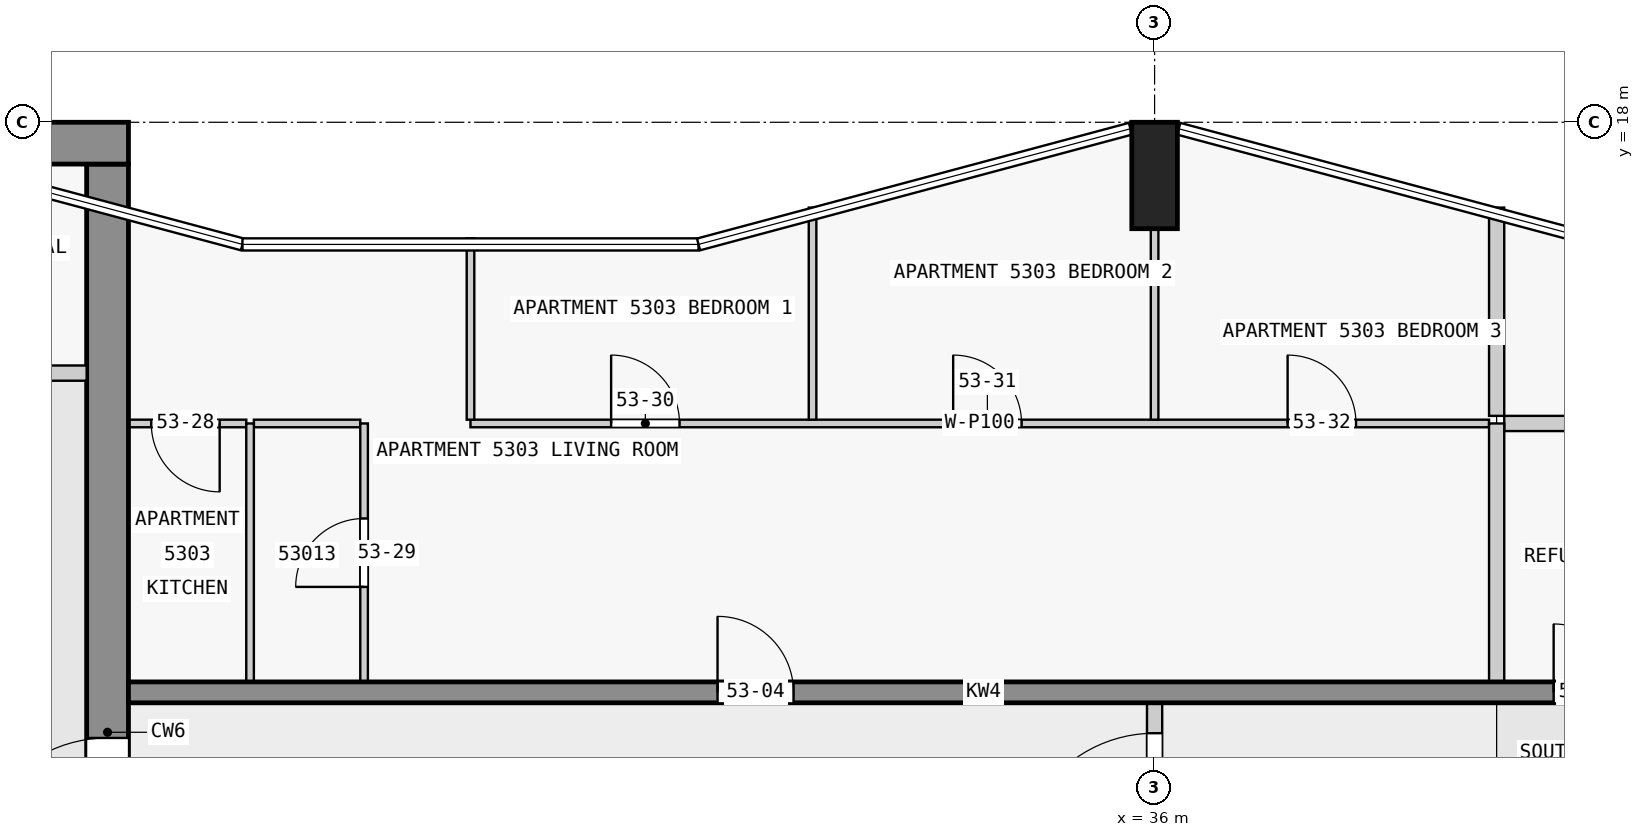
"""IFC4 building model, lengths in metres.
Left out: names, types, materials, properties, quantities, classifications, styles, units other than length and angle.
Written with IfcOpenShell. Run it as: python <this file> out.ifc"""

import sys

from ifc_helpers import new_model, si_unit, direction, frame, frame_2d, origin, origin_2d, place, context, subcontext, project, spatial, rectangle, extrude, element, fill, save


model = new_model("IFC4")
c1 = context("Model", 3, precision=1e-05, world=origin(), true_north=direction((0.0, 1.0)))
c2 = subcontext(c1, "Body", "Model", "MODEL_VIEW")
j1 = project(units=[si_unit("LENGTHUNIT", "METRE"), si_unit("PLANEANGLEUNIT", "RADIAN")], contexts=[c1])
p1 = place(None, origin())
s1 = spatial("IfcSite", under=j1, at=p1, CompositionType="ELEMENT")
p2 = place(p1, origin())
s2 = spatial("IfcBuilding", under=s1, at=p2, CompositionType="ELEMENT")
p3 = place(p2, frame((0.0, 0.0, 204.9)))
s3 = spatial("IfcBuildingStorey", under=s2, at=p3, CompositionType="ELEMENT", Elevation=204.9)
p4 = place(p3, frame((36.0, 17.3, 0.0), z_axis=(0.0, 0.0, 1.0), x_axis=(1.0, 0.0, 0.0)))
e1 = element("IfcColumn", 1, at=p4, inside=s3, PredefinedType="COLUMN", context=c2, shape_type="SweptSolid", body=[
    extrude(rectangle(XDim=0.6, YDim=1.4, at=origin_2d()), origin(), (0.0, 0.0, 1.0), 3.5),
])
p5 = place(p3, frame((1.38, 17.725, 0.0), z_axis=(0.0, 0.0, 1.0), x_axis=(1.0, 0.0, 0.0)))
e2 = element("IfcWall", 2, at=p5, inside=s3, PredefinedType="SHEAR", context=c2, shape_type="SweptSolid", body=[
    extrude(rectangle(XDim=21.12, YDim=0.55, at=frame_2d((10.56, 0.0))), origin(), (0.0, 0.0, 1.0), 3.25),
])
p6 = place(p5, frame((6.35, 0.0, 0.0)))
e3 = element("IfcOpeningElement", 3, at=p6, cuts=e2, PredefinedType="OPENING", context=c2, shape_type="SweptSolid", body=[
    extrude(rectangle(XDim=1.8, YDim=2.1, at=frame_2d((0.9, 1.05))), frame((0.0, 0.285, 0.0), z_axis=(0.0, -1.0, 0.0), x_axis=(1.0, 0.0, 0.0)), (0.0, 0.0, 1.0), 0.57),
])
p7 = place(p3, frame((22.225, 2.5, 0.0), z_axis=(0.0, 0.0, 1.0), x_axis=(0.0, 1.0, 0.0)))
e4 = element("IfcWall", 4, at=p7, inside=s3, PredefinedType="SHEAR", context=c2, shape_type="SweptSolid", body=[
    extrude(rectangle(XDim=14.95, YDim=0.55, at=frame_2d((7.475, 0.0))), origin(), (0.0, 0.0, 1.0), 3.25),
])
p8 = place(p7, frame((5.6, 0.0, 0.0)))
e5 = element("IfcOpeningElement", 5, at=p8, cuts=e4, PredefinedType="OPENING", context=c2, shape_type="SweptSolid", body=[
    extrude(rectangle(XDim=1.8, YDim=2.1, at=frame_2d((0.9, 1.05))), frame((0.0, 0.285, 0.0), z_axis=(0.0, -1.0, 0.0), x_axis=(1.0, 0.0, 0.0)), (0.0, 0.0, 1.0), 0.57),
])
p9 = place(p3, frame((22.5, 10.5, 0.0), z_axis=(0.0, 0.0, 1.0), x_axis=(1.0, 0.0, 0.0)))
e6 = element("IfcWall", 6, at=p9, inside=s3, PredefinedType="SHEAR", context=c2, shape_type="SweptSolid", body=[
    extrude(rectangle(XDim=22.5, YDim=0.275, at=frame_2d((11.25, 0.0))), origin(), (0.0, 0.0, 1.0), 3.25),
])
p10 = place(p9, frame((7.75, 0.0, 0.0)))
e7 = element("IfcOpeningElement", 7, at=p10, cuts=e6, PredefinedType="OPENING", context=c2, shape_type="SweptSolid", body=[
    extrude(rectangle(XDim=1.0, YDim=2.1, at=frame_2d((0.5, 1.05))), frame((0.0, 0.147, 0.0), z_axis=(0.0, -1.0, 0.0), x_axis=(1.0, 0.0, 0.0)), (0.0, 0.0, 1.0), 0.295),
])
p11 = place(p9, frame((18.75, 0.0, 0.0)))
e8 = element("IfcOpeningElement", 8, at=p11, cuts=e6, PredefinedType="OPENING", context=c2, shape_type="SweptSolid", body=[
    extrude(rectangle(XDim=0.9, YDim=2.1, at=frame_2d((0.45, 1.05))), frame((0.0, 0.147, 0.0), z_axis=(0.0, -1.0, 0.0), x_axis=(1.0, 0.0, 0.0)), (0.0, 0.0, 1.0), 0.295),
])
p12 = place(p9, frame((20.95, 0.0, 0.0)))
e9 = element("IfcOpeningElement", 9, at=p12, cuts=e6, PredefinedType="OPENING", context=c2, shape_type="SweptSolid", body=[
    extrude(rectangle(XDim=1.0, YDim=2.1, at=frame_2d((0.5, 1.05))), frame((0.0, 0.147, 0.0), z_axis=(0.0, -1.0, 0.0), x_axis=(1.0, 0.0, 0.0)), (0.0, 0.0, 1.0), 0.295),
])
p13 = place(p3, frame((18.6, 14.7, 0.0), z_axis=(0.0, 0.0, 1.0), x_axis=(1.0, 0.0, 0.0)))
e10 = element("IfcWall", 10, at=p13, inside=s3, PredefinedType="PARTITIONING", context=c2, shape_type="SweptSolid", body=[
    extrude(rectangle(XDim=3.35, YDim=0.2, at=frame_2d((1.675, 0.0))), origin(), (0.0, 0.0, 1.0), 3.25),
])
p14 = place(p13, frame((0.15, 0.0, 0.0)))
e11 = element("IfcOpeningElement", 11, at=p14, cuts=e10, PredefinedType="OPENING", context=c2, shape_type="SweptSolid", body=[
    extrude(rectangle(XDim=0.9, YDim=2.1, at=frame_2d((0.45, 1.05))), frame((0.0, 0.11, 0.0), z_axis=(0.0, -1.0, 0.0), x_axis=(1.0, 0.0, 0.0)), (0.0, 0.0, 1.0), 0.22),
])
p15 = place(p13, frame((1.825, 0.0, 0.0)))
e12 = element("IfcOpeningElement", 12, at=p15, cuts=e10, PredefinedType="OPENING", context=c2, shape_type="SweptSolid", body=[
    extrude(rectangle(XDim=0.9, YDim=2.1, at=frame_2d((0.45, 1.05))), frame((0.0, 0.11, 0.0), z_axis=(0.0, -1.0, 0.0), x_axis=(1.0, 0.0, 0.0)), (0.0, 0.0, 1.0), 0.22),
])
p16 = place(p3, frame((24.05, 14.038, 0.0), z_axis=(0.0, 0.0, 1.0), x_axis=(-1.0, 0.0, 0.0)))
e13 = element("IfcWall", 13, at=p16, inside=s3, PredefinedType="PARTITIONING", context=c2, shape_type="SweptSolid", body=[
    extrude(rectangle(XDim=1.55, YDim=0.1, at=frame_2d((0.775, 0.0))), origin(), (0.0, 0.0, 1.0), 3.25),
])
p17 = place(p16, frame((0.35, 0.0, 0.0)))
e14 = element("IfcOpeningElement", 14, at=p17, cuts=e13, PredefinedType="OPENING", context=c2, shape_type="SweptSolid", body=[
    extrude(rectangle(XDim=0.9, YDim=2.1, at=frame_2d((0.45, 1.05))), frame((0.0, 0.06, 0.0), z_axis=(0.0, -1.0, 0.0), x_axis=(1.0, 0.0, 0.0)), (0.0, 0.0, 1.0), 0.12),
])
p18 = place(p3, frame((25.55, 14.038, 0.0), z_axis=(0.0, 0.0, 1.0), x_axis=(-1.0, 0.0, 0.0)))
e15 = element("IfcWall", 15, at=p18, inside=s3, PredefinedType="PARTITIONING", context=c2, shape_type="SweptSolid", body=[
    extrude(rectangle(XDim=1.4, YDim=0.1, at=frame_2d((0.7, 0.0))), origin(), (0.0, 0.0, 1.0), 3.25),
])
p19 = place(p3, frame((27.0, 14.038, 0.0), z_axis=(0.0, 0.0, 1.0), x_axis=(1.0, 0.0, 0.0)))
e16 = element("IfcWall", 16, at=p19, inside=s3, PredefinedType="PARTITIONING", context=c2, shape_type="SweptSolid", body=[
    extrude(rectangle(XDim=13.4, YDim=0.1, at=frame_2d((6.7, 0.0))), origin(), (0.0, 0.0, 1.0), 3.25),
])
p20 = place(p19, frame((1.85, 0.0, 0.0)))
e17 = element("IfcOpeningElement", 17, at=p20, cuts=e16, PredefinedType="OPENING", context=c2, shape_type="SweptSolid", body=[
    extrude(rectangle(XDim=0.9, YDim=2.1, at=frame_2d((0.45, 1.05))), frame((0.0, 0.06, 0.0), z_axis=(0.0, -1.0, 0.0), x_axis=(1.0, 0.0, 0.0)), (0.0, 0.0, 1.0), 0.12),
])
p21 = place(p19, frame((6.35, 0.0, 0.0)))
e18 = element("IfcOpeningElement", 18, at=p21, cuts=e16, PredefinedType="OPENING", context=c2, shape_type="SweptSolid", body=[
    extrude(rectangle(XDim=0.9, YDim=2.1, at=frame_2d((0.45, 1.05))), frame((0.0, 0.06, 0.0), z_axis=(0.0, -1.0, 0.0), x_axis=(1.0, 0.0, 0.0)), (0.0, 0.0, 1.0), 0.12),
])
p22 = place(p19, frame((10.75, 0.0, 0.0)))
e19 = element("IfcOpeningElement", 19, at=p22, cuts=e16, PredefinedType="OPENING", context=c2, shape_type="SweptSolid", body=[
    extrude(rectangle(XDim=0.9, YDim=2.1, at=frame_2d((0.45, 1.05))), frame((0.0, 0.06, 0.0), z_axis=(0.0, -1.0, 0.0), x_axis=(1.0, 0.0, 0.0)), (0.0, 0.0, 1.0), 0.12),
])
p23 = place(p3, frame((42.8, 14.038, 0.0), z_axis=(0.0, 0.0, 1.0), x_axis=(-1.0, 0.0, 0.0)))
e20 = element("IfcWall", 20, at=p23, inside=s3, PredefinedType="PARTITIONING", context=c2, shape_type="SweptSolid", body=[
    extrude(rectangle(XDim=2.2, YDim=0.2, at=frame_2d((1.1, 0.0))), origin(), (0.0, 0.0, 1.0), 3.25),
])
p24 = place(p3, frame((24.1, 10.637, 0.0), z_axis=(0.0, 0.0, 1.0), x_axis=(0.0, 1.0, 0.0)))
e21 = element("IfcWall", 21, at=p24, inside=s3, PredefinedType="PARTITIONING", context=c2, shape_type="SweptSolid", body=[
    extrude(rectangle(XDim=3.4, YDim=0.1, at=frame_2d((1.7, 0.0))), origin(), (0.0, 0.0, 1.0), 3.25),
])
p25 = place(p3, frame((25.6, 10.637, 0.0), z_axis=(0.0, 0.0, 1.0), x_axis=(0.0, 1.0, 0.0)))
e22 = element("IfcWall", 22, at=p25, inside=s3, PredefinedType="PARTITIONING", context=c2, shape_type="SweptSolid", body=[
    extrude(rectangle(XDim=3.4, YDim=0.1, at=frame_2d((1.7, 0.0))), origin(), (0.0, 0.0, 1.0), 3.25),
])
p26 = place(p25, frame((1.25, 0.0, 0.0)))
e23 = element("IfcOpeningElement", 23, at=p26, cuts=e22, PredefinedType="OPENING", context=c2, shape_type="SweptSolid", body=[
    extrude(rectangle(XDim=0.9, YDim=2.1, at=frame_2d((0.45, 1.05))), frame((0.0, 0.06, 0.0), z_axis=(0.0, -1.0, 0.0), x_axis=(1.0, 0.0, 0.0)), (0.0, 0.0, 1.0), 0.12),
])
p27 = place(p3, frame((27.0, 16.473, 0.0), z_axis=(0.0, 0.0, 1.0), x_axis=(0.0, -1.0, 0.0)))
e24 = element("IfcWall", 24, at=p27, inside=s3, PredefinedType="PARTITIONING", context=c2, shape_type="SweptSolid", body=[
    extrude(rectangle(XDim=2.386, YDim=0.1, at=frame_2d((1.193, 0.0))), origin(), (0.0, 0.0, 1.0), 3.25),
])
p28 = place(p3, frame((31.5, 14.087, 0.0), z_axis=(0.0, 0.0, 1.0), x_axis=(0.0, 1.0, 0.0)))
e25 = element("IfcWall", 25, at=p28, inside=s3, PredefinedType="PARTITIONING", context=c2, shape_type="SweptSolid", body=[
    extrude(rectangle(XDim=2.79, YDim=0.1, at=frame_2d((1.395, 0.0))), origin(), (0.0, 0.0, 1.0), 3.25),
])
p29 = place(p3, frame((36.0, 14.087, 0.0), z_axis=(0.0, 0.0, 1.0), x_axis=(0.0, 1.0, 0.0)))
e26 = element("IfcWall", 26, at=p29, inside=s3, PredefinedType="PARTITIONING", context=c2, shape_type="SweptSolid", body=[
    extrude(rectangle(XDim=2.513, YDim=0.1, at=frame_2d((1.256, 0.0))), origin(), (0.0, 0.0, 1.0), 3.25),
])
p30 = place(p3, frame((40.5, 14.038, 0.0), z_axis=(0.0, 0.0, 1.0), x_axis=(0.0, -1.0, 0.0)))
e27 = element("IfcWall", 27, at=p30, inside=s3, PredefinedType="PARTITIONING", context=c2, shape_type="SweptSolid", body=[
    extrude(rectangle(XDim=3.4, YDim=0.2, at=frame_2d((1.7, 0.0))), origin(), (0.0, 0.0, 1.0), 3.25),
])
p31 = place(p3, frame((40.5, 14.137, 0.0), z_axis=(0.0, 0.0, 1.0), x_axis=(0.0, 1.0, 0.0)))
e28 = element("IfcWall", 28, at=p31, inside=s3, PredefinedType="PARTITIONING", context=c2, shape_type="SweptSolid", body=[
    extrude(rectangle(XDim=2.74, YDim=0.2, at=frame_2d((1.37, 0.0))), origin(), (0.0, 0.0, 1.0), 3.25),
])
p32 = place(p3, frame((36.0, 7.462, 0.0), z_axis=(0.0, 0.0, 1.0), x_axis=(0.0, 1.0, 0.0)))
e29 = element("IfcWall", 29, at=p32, inside=s3, PredefinedType="PARTITIONING", context=c2, shape_type="SweptSolid", body=[
    extrude(rectangle(XDim=3.175, YDim=0.2, at=frame_2d((1.587, 0.0))), origin(), (0.0, 0.0, 1.0), 3.25),
])
p33 = place(p32, frame((0.7, 0.0, 0.0)))
e30 = element("IfcOpeningElement", 30, at=p33, cuts=e29, PredefinedType="OPENING", context=c2, shape_type="SweptSolid", body=[
    extrude(rectangle(XDim=1.8, YDim=2.1, at=frame_2d((0.9, 1.05))), frame((0.0, 0.11, 0.0), z_axis=(0.0, -1.0, 0.0), x_axis=(1.0, 0.0, 0.0)), (0.0, 0.0, 1.0), 0.22),
])
p34 = place(p8, origin())
e31 = element("IfcDoor", 31, at=p34, inside=s3, OperationType="DOUBLE_DOOR_SINGLE_SWING", PredefinedType="DOOR", context=c2, shape_type="SweptSolid", body=[
    extrude(rectangle(XDim=1.8, YDim=2.1, at=frame_2d((0.9, 1.05))), frame((0.0, 0.025, 0.0), z_axis=(0.0, -1.0, 0.0), x_axis=(1.0, 0.0, 0.0)), (0.0, 0.0, 1.0), 0.05),
])
fill(e5, e31)
p35 = place(p10, origin())
e32 = element("IfcDoor", 32, at=p35, inside=s3, OperationType="SINGLE_SWING_LEFT", PredefinedType="DOOR", context=c2, shape_type="SweptSolid", body=[
    extrude(rectangle(XDim=1.0, YDim=2.1, at=frame_2d((0.5, 1.05))), frame((0.0, 0.025, 0.0), z_axis=(0.0, -1.0, 0.0), x_axis=(1.0, 0.0, 0.0)), (0.0, 0.0, 1.0), 0.05),
])
fill(e7, e32)
p36 = place(p11, origin())
e33 = element("IfcDoor", 33, at=p36, inside=s3, OperationType="SINGLE_SWING_RIGHT", PredefinedType="DOOR", context=c2, shape_type="SweptSolid", body=[
    extrude(rectangle(XDim=0.9, YDim=2.1, at=frame_2d((0.45, 1.05))), frame((0.0, 0.025, 0.0), z_axis=(0.0, -1.0, 0.0), x_axis=(1.0, 0.0, 0.0)), (0.0, 0.0, 1.0), 0.05),
])
fill(e8, e33)
p37 = place(p33, origin())
e34 = element("IfcDoor", 34, at=p37, inside=s3, OperationType="SINGLE_SWING_RIGHT", PredefinedType="DOOR", context=c2, shape_type="SweptSolid", body=[
    extrude(rectangle(XDim=1.8, YDim=2.1, at=frame_2d((0.9, 1.05))), frame((0.0, 0.025, 0.0), z_axis=(0.0, -1.0, 0.0), x_axis=(1.0, 0.0, 0.0)), (0.0, 0.0, 1.0), 0.05),
])
fill(e30, e34)
p38 = place(p17, origin())
e35 = element("IfcDoor", 35, at=p38, inside=s3, OperationType="SINGLE_SWING_RIGHT", PredefinedType="DOOR", context=c2, shape_type="SweptSolid", body=[
    extrude(rectangle(XDim=0.9, YDim=2.1, at=frame_2d((0.45, 1.05))), frame((0.0, 0.025, 0.0), z_axis=(0.0, -1.0, 0.0), x_axis=(1.0, 0.0, 0.0)), (0.0, 0.0, 1.0), 0.05),
])
fill(e14, e35)
p39 = place(p26, origin())
e36 = element("IfcDoor", 36, at=p39, inside=s3, OperationType="SINGLE_SWING_LEFT", PredefinedType="DOOR", context=c2, shape_type="SweptSolid", body=[
    extrude(rectangle(XDim=0.9, YDim=2.1, at=frame_2d((0.45, 1.05))), frame((0.0, 0.025, 0.0), z_axis=(0.0, -1.0, 0.0), x_axis=(1.0, 0.0, 0.0)), (0.0, 0.0, 1.0), 0.05),
])
fill(e23, e36)
p40 = place(p20, origin())
e37 = element("IfcDoor", 37, at=p40, inside=s3, OperationType="SINGLE_SWING_LEFT", PredefinedType="DOOR", context=c2, shape_type="SweptSolid", body=[
    extrude(rectangle(XDim=0.9, YDim=2.1, at=frame_2d((0.45, 1.05))), frame((0.0, 0.025, 0.0), z_axis=(0.0, -1.0, 0.0), x_axis=(1.0, 0.0, 0.0)), (0.0, 0.0, 1.0), 0.05),
])
fill(e17, e37)
p41 = place(p21, origin())
e38 = element("IfcDoor", 38, at=p41, inside=s3, OperationType="SINGLE_SWING_RIGHT", PredefinedType="DOOR", context=c2, shape_type="SweptSolid", body=[
    extrude(rectangle(XDim=0.9, YDim=2.1, at=frame_2d((0.45, 1.05))), frame((0.0, 0.025, 0.0), z_axis=(0.0, -1.0, 0.0), x_axis=(1.0, 0.0, 0.0)), (0.0, 0.0, 1.0), 0.05),
])
fill(e18, e38)
p42 = place(p22, origin())
e39 = element("IfcDoor", 39, at=p42, inside=s3, OperationType="SINGLE_SWING_RIGHT", PredefinedType="DOOR", context=c2, shape_type="SweptSolid", body=[
    extrude(rectangle(XDim=0.9, YDim=2.1, at=frame_2d((0.45, 1.05))), frame((0.0, 0.025, 0.0), z_axis=(0.0, -1.0, 0.0), x_axis=(1.0, 0.0, 0.0)), (0.0, 0.0, 1.0), 0.05),
])
fill(e19, e39)
save(model, sys.argv[1])
